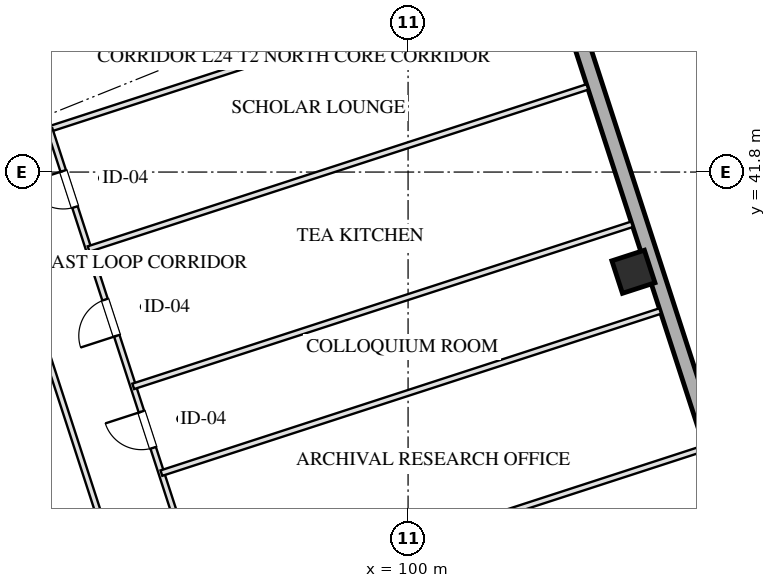
"""IFC4 building model, lengths in metres.
Left out: names, types, materials, properties, quantities, classifications, styles, units other than length and angle.
Written with IfcOpenShell. Run it as: python <this file> out.ifc"""

import sys

from ifc_helpers import new_model, si_unit, direction, frame, frame_2d, origin, origin_2d, place, context, subcontext, project, spatial, rectangle, hollow_rectangle, extrude, element, fill, save


model = new_model("IFC4")
c1 = context("Model", 3, precision=1e-05, world=origin(), true_north=direction((0.0, 1.0)))
c2 = subcontext(c1, "Body", "Model", "MODEL_VIEW")
j1 = project(units=[si_unit("LENGTHUNIT", "METRE"), si_unit("PLANEANGLEUNIT", "RADIAN")], contexts=[c1])
p1 = place(None, origin())
s1 = spatial("IfcSite", under=j1, at=p1, CompositionType="ELEMENT")
p2 = place(p1, origin())
s2 = spatial("IfcBuilding", under=s1, at=p2, CompositionType="ELEMENT")
p3 = place(p2, frame((0.0, 0.0, 96.6)))
s3 = spatial("IfcBuildingStorey", under=s2, at=p3, CompositionType="ELEMENT", Elevation=96.6)
p4 = place(p3, frame((105.93, 39.176, 0.0), z_axis=(0.0, 0.0, 1.0), x_axis=(0.951056516295, 0.309016994375, 0.0)))
e1 = element("IfcColumn", 1, at=p4, inside=s3, PredefinedType="COLUMN", context=c2, shape_type="SweptSolid", body=[
    extrude(hollow_rectangle(XDim=0.9, YDim=0.9, WallThickness=0.032, at=origin_2d()), origin(), (0.0, 0.0, 1.0), 3.451),
])
p5 = place(p3, frame((99.284, 61.41, 0.0), z_axis=(0.0, 0.0, 1.0), x_axis=(0.309017542002, -0.95105633836, 0.0)))
e2 = element("IfcWall", 2, at=p5, inside=s3, PredefinedType="SOLIDWALL", context=c2, shape_type="SweptSolid", body=[
    extrude(rectangle(XDim=46.4, YDim=0.4, at=frame_2d((23.2, 0.0))), origin(), (0.0, 0.0, 1.0), 2.55),
])
p6 = place(p3, frame((86.743, 44.508, 0.0), z_axis=(0.0, 0.0, 1.0), x_axis=(0.951063829732, 0.308994485023, 0.0)))
e3 = element("IfcWall", 3, at=p6, inside=s3, PredefinedType="PARTITIONING", context=c2, shape_type="SweptSolid", body=[
    extrude(rectangle(XDim=4.4, YDim=0.15, at=frame_2d((2.2, 0.0))), origin(), (0.0, 0.0, 1.0), 3.155),
])
p7 = place(p6, frame((1.45, 0.0, 0.0)))
e4 = element("IfcOpeningElement", 4, at=p7, cuts=e3, PredefinedType="OPENING", context=c2, shape_type="SweptSolid", body=[
    extrude(rectangle(XDim=1.5, YDim=2.05, at=frame_2d((0.75, 1.025))), frame((0.0, 0.085, 0.0), z_axis=(0.0, -1.0, 0.0), x_axis=(1.0, 0.0, 0.0)), (0.0, 0.0, 1.0), 0.17),
])
p8 = place(p3, frame((90.567, 42.933, 0.0), z_axis=(0.0, 0.0, 1.0), x_axis=(0.951058377365, 0.309011266531, 0.0)))
e5 = element("IfcWall", 5, at=p8, inside=s3, PredefinedType="PARTITIONING", context=c2, shape_type="SweptSolid", body=[
    extrude(rectangle(XDim=13.8, YDim=0.15, at=frame_2d((6.9, 0.0))), origin(), (0.0, 0.0, 1.0), 3.155),
])
p9 = place(p3, frame((93.903, 26.52, 0.0), z_axis=(0.0, 0.0, 1.0), x_axis=(-0.30901773025, 0.951056277195, 0.0)))
e6 = element("IfcWall", 6, at=p9, inside=s3, PredefinedType="PARTITIONING", context=c2, shape_type="SweptSolid", body=[
    extrude(rectangle(XDim=16.64, YDim=0.15, at=frame_2d((8.32, 0.0))), origin(), (0.0, 0.0, 1.0), 3.155),
])
p10 = place(p3, frame((95.709, 27.107, 0.0), z_axis=(0.0, 0.0, 1.0), x_axis=(-0.30901773025, 0.951056277195, 0.0)))
e7 = element("IfcWall", 7, at=p10, inside=s3, PredefinedType="PARTITIONING", context=c2, shape_type="SweptSolid", body=[
    extrude(rectangle(XDim=16.64, YDim=0.15, at=frame_2d((8.32, 0.0))), origin(), (0.0, 0.0, 1.0), 3.155),
])
p11 = place(p10, frame((1.164, 0.0, 0.0)))
e8 = element("IfcOpeningElement", 8, at=p11, cuts=e7, PredefinedType="OPENING", context=c2, shape_type="SweptSolid", body=[
    extrude(rectangle(XDim=1.05, YDim=2.05, at=frame_2d((0.525, 1.025))), frame((0.0, 0.085, 0.0), z_axis=(0.0, -1.0, 0.0), x_axis=(1.0, 0.0, 0.0)), (0.0, 0.0, 1.0), 0.17),
])
p12 = place(p10, frame((4.724, 0.0, 0.0)))
e9 = element("IfcOpeningElement", 9, at=p12, cuts=e7, PredefinedType="OPENING", context=c2, shape_type="SweptSolid", body=[
    extrude(rectangle(XDim=0.85, YDim=2.05, at=frame_2d((0.425, 1.025))), frame((0.0, 0.085, 0.0), z_axis=(0.0, -1.0, 0.0), x_axis=(1.0, 0.0, 0.0)), (0.0, 0.0, 1.0), 0.17),
])
p13 = place(p10, frame((7.82, 0.0, 0.0)))
e10 = element("IfcOpeningElement", 10, at=p13, cuts=e7, PredefinedType="OPENING", context=c2, shape_type="SweptSolid", body=[
    extrude(rectangle(XDim=1.0, YDim=2.05, at=frame_2d((0.5, 1.025))), frame((0.0, 0.085, 0.0), z_axis=(0.0, -1.0, 0.0), x_axis=(1.0, 0.0, 0.0)), (0.0, 0.0, 1.0), 0.17),
])
p14 = place(p10, frame((10.92, 0.0, 0.0)))
e11 = element("IfcOpeningElement", 11, at=p14, cuts=e7, PredefinedType="OPENING", context=c2, shape_type="SweptSolid", body=[
    extrude(rectangle(XDim=1.0, YDim=2.05, at=frame_2d((0.5, 1.025))), frame((0.0, 0.085, 0.0), z_axis=(0.0, -1.0, 0.0), x_axis=(1.0, 0.0, 0.0)), (0.0, 0.0, 1.0), 0.17),
])
p15 = place(p10, frame((14.48, 0.0, 0.0)))
e12 = element("IfcOpeningElement", 12, at=p15, cuts=e7, PredefinedType="OPENING", context=c2, shape_type="SweptSolid", body=[
    extrude(rectangle(XDim=1.0, YDim=2.05, at=frame_2d((0.5, 1.025))), frame((0.0, 0.085, 0.0), z_axis=(0.0, -1.0, 0.0), x_axis=(1.0, 0.0, 0.0)), (0.0, 0.0, 1.0), 0.17),
])
p16 = place(p3, frame((94.681, 30.272, 0.0), z_axis=(0.0, 0.0, 1.0), x_axis=(0.951051488548, 0.309032467762, 0.0)))
e13 = element("IfcWall", 13, at=p16, inside=s3, PredefinedType="PARTITIONING", context=c2, shape_type="SweptSolid", body=[
    extrude(rectangle(XDim=13.8, YDim=0.15, at=frame_2d((6.9, 0.0))), origin(), (0.0, 0.0, 1.0), 3.155),
])
p17 = place(p3, frame((93.509, 33.878, 0.0), z_axis=(0.0, 0.0, 1.0), x_axis=(0.951056688031, 0.309016465825, 0.0)))
e14 = element("IfcWall", 14, at=p17, inside=s3, PredefinedType="PARTITIONING", context=c2, shape_type="SweptSolid", body=[
    extrude(rectangle(XDim=13.8, YDim=0.15, at=frame_2d((6.9, 0.0))), origin(), (0.0, 0.0, 1.0), 3.155),
])
p18 = place(p3, frame((92.768, 36.161, 0.0), z_axis=(0.0, 0.0, 1.0), x_axis=(0.951058377365, 0.309011266531, 0.0)))
e15 = element("IfcWall", 15, at=p18, inside=s3, PredefinedType="PARTITIONING", context=c2, shape_type="SweptSolid", body=[
    extrude(rectangle(XDim=13.8, YDim=0.15, at=frame_2d((6.9, 0.0))), origin(), (0.0, 0.0, 1.0), 3.155),
])
p19 = place(p3, frame((91.594, 39.775, 0.0), z_axis=(0.0, 0.0, 1.0), x_axis=(0.951056688031, 0.309016465825, 0.0)))
e16 = element("IfcWall", 16, at=p19, inside=s3, PredefinedType="PARTITIONING", context=c2, shape_type="SweptSolid", body=[
    extrude(rectangle(XDim=13.8, YDim=0.15, at=frame_2d((6.9, 0.0))), origin(), (0.0, 0.0, 1.0), 3.155),
])
p20 = place(p13, origin())
e17 = element("IfcDoor", 17, at=p20, inside=s3, OperationType="SINGLE_SWING_RIGHT", PredefinedType="DOOR", context=c2, shape_type="SweptSolid", body=[
    extrude(rectangle(XDim=1.0, YDim=2.05, at=frame_2d((0.5, 1.025))), frame((0.0, 0.025, 0.0), z_axis=(0.0, -1.0, 0.0), x_axis=(1.0, 0.0, 0.0)), (0.0, 0.0, 1.0), 0.05),
])
fill(e10, e17)
p21 = place(p14, origin())
e18 = element("IfcDoor", 18, at=p21, inside=s3, OperationType="SINGLE_SWING_LEFT", PredefinedType="DOOR", context=c2, shape_type="SweptSolid", body=[
    extrude(rectangle(XDim=1.0, YDim=2.05, at=frame_2d((0.5, 1.025))), frame((0.0, 0.025, 0.0), z_axis=(0.0, -1.0, 0.0), x_axis=(1.0, 0.0, 0.0)), (0.0, 0.0, 1.0), 0.05),
])
fill(e11, e18)
p22 = place(p15, origin())
e19 = element("IfcDoor", 19, at=p22, inside=s3, OperationType="SINGLE_SWING_RIGHT", PredefinedType="DOOR", context=c2, shape_type="SweptSolid", body=[
    extrude(rectangle(XDim=1.0, YDim=2.05, at=frame_2d((0.5, 1.025))), frame((0.0, 0.025, 0.0), z_axis=(0.0, -1.0, 0.0), x_axis=(1.0, 0.0, 0.0)), (0.0, 0.0, 1.0), 0.05),
])
fill(e12, e19)
save(model, sys.argv[1])
